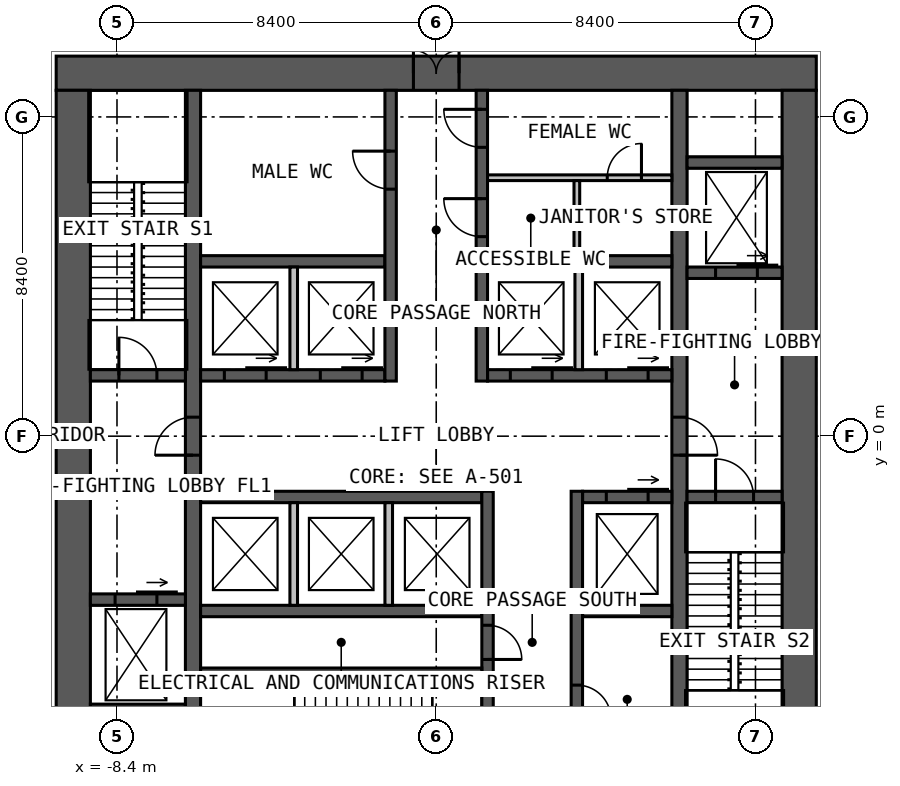
"""IFC4 building model, lengths in metres.
Left out: names, types, materials, properties, quantities, classifications, styles, units other than length and angle.
Written with IfcOpenShell. Run it as: python <this file> out.ifc"""

import sys

from ifc_helpers import new_model, si_unit, direction, frame, frame_2d, origin, place, context, subcontext, project, spatial, rectangle, extrude, element, fill, save


model = new_model("IFC4")
c1 = context("Model", 3, precision=1e-05, world=origin(), true_north=direction((0.0, 1.0)))
c2 = subcontext(c1, "Body", "Model", "MODEL_VIEW")
j1 = project(units=[si_unit("LENGTHUNIT", "METRE"), si_unit("PLANEANGLEUNIT", "RADIAN")], contexts=[c1])
p1 = place(None, origin())
s1 = spatial("IfcSite", under=j1, at=p1, CompositionType="ELEMENT")
p2 = place(p1, origin())
s2 = spatial("IfcBuilding", under=s1, at=p2, CompositionType="ELEMENT")
p3 = place(p2, frame((0.0, 0.0, 6.0)))
s3 = spatial("IfcBuildingStorey", under=s2, at=p3, CompositionType="ELEMENT", Elevation=6.0)
p4 = place(p3, frame((-10.0, 9.55, 0.0), z_axis=(0.0, 0.0, 1.0), x_axis=(1.0, 0.0, 0.0)))
e1 = element("IfcWall", 1, at=p4, inside=s3, PredefinedType="SOLIDWALL", context=c2, shape_type="SweptSolid", body=[
    extrude(rectangle(XDim=20.0, YDim=0.9, at=frame_2d((10.0, 0.0))), origin(), (0.0, 0.0, 1.0), 5.0),
])
p5 = place(p4, frame((9.4, 0.0, 0.0)))
e2 = element("IfcOpeningElement", 2, at=p5, cuts=e1, PredefinedType="OPENING", context=c2, shape_type="SweptSolid", body=[
    extrude(rectangle(XDim=1.2, YDim=2.2, at=frame_2d((0.6, 1.1))), frame((0.0, 0.46, 0.0), z_axis=(0.0, -1.0, 0.0), x_axis=(1.0, 0.0, 0.0)), (0.0, 0.0, 1.0), 0.92),
])
for number, where, z_axis, x_axis in (
    (3, (9.55, -9.1, 0.0), (0.0, 0.0, 1.0), (0.0, 1.0, 0.0)),
    (4, (-9.55, 9.1, 0.0), (0.0, 0.0, 1.0), (0.0, -1.0, 0.0)),
):
    element("IfcWall", number, at=place(p3, frame(where, z_axis=z_axis, x_axis=x_axis)), inside=s3, PredefinedType="SOLIDWALL", context=c2, shape_type="SweptSolid", body=[
        extrude(rectangle(XDim=18.2, YDim=0.9, at=frame_2d((9.1, 0.0))), origin(), (0.0, 0.0, 1.0), 5.0),
    ])
p6 = place(p3, frame((-6.4, -9.1, 0.0), z_axis=(0.0, 0.0, 1.0), x_axis=(0.0, 1.0, 0.0)))
e5 = element("IfcWall", 5, at=p6, inside=s3, PredefinedType="SOLIDWALL", context=c2, shape_type="SweptSolid", body=[
    extrude(rectangle(XDim=18.2, YDim=0.4, at=frame_2d((9.1, 0.0))), origin(), (0.0, 0.0, 1.0), 5.0),
])
p7 = place(p6, frame((8.6, 0.0, 0.0)))
e6 = element("IfcOpeningElement", 6, at=p7, cuts=e5, PredefinedType="OPENING", context=c2, shape_type="SweptSolid", body=[
    extrude(rectangle(XDim=1.0, YDim=2.2, at=frame_2d((0.5, 1.1))), frame((0.0, 0.21, 0.0), z_axis=(0.0, -1.0, 0.0), x_axis=(1.0, 0.0, 0.0)), (0.0, 0.0, 1.0), 0.42),
])
p8 = place(p3, frame((6.4, 9.1, 0.0), z_axis=(0.0, 0.0, 1.0), x_axis=(0.0, -1.0, 0.0)))
e7 = element("IfcWall", 7, at=p8, inside=s3, PredefinedType="SOLIDWALL", context=c2, shape_type="SweptSolid", body=[
    extrude(rectangle(XDim=18.2, YDim=0.4, at=frame_2d((9.1, 0.0))), origin(), (0.0, 0.0, 1.0), 5.0),
])
p9 = place(p8, frame((8.6, 0.0, 0.0)))
e8 = element("IfcOpeningElement", 8, at=p9, cuts=e7, PredefinedType="OPENING", context=c2, shape_type="SweptSolid", body=[
    extrude(rectangle(XDim=1.0, YDim=2.2, at=frame_2d((0.5, 1.1))), frame((0.0, 0.21, 0.0), z_axis=(0.0, -1.0, 0.0), x_axis=(1.0, 0.0, 0.0)), (0.0, 0.0, 1.0), 0.42),
])
p10 = place(p3, frame((-6.2, 1.6, 0.0), z_axis=(0.0, 0.0, 1.0), x_axis=(1.0, 0.0, 0.0)))
e9 = element("IfcWall", 9, at=p10, inside=s3, PredefinedType="SOLIDWALL", context=c2, shape_type="SweptSolid", body=[
    extrude(rectangle(XDim=4.85, YDim=0.3, at=frame_2d((2.425, 0.0))), origin(), (0.0, 0.0, 1.0), 5.0),
])
p11 = place(p10, frame((0.625, 0.0, 0.0)))
e10 = element("IfcOpeningElement", 10, at=p11, cuts=e9, PredefinedType="OPENING", context=c2, shape_type="SweptSolid", body=[
    extrude(rectangle(XDim=1.1, YDim=2.2, at=frame_2d((0.55, 1.1))), frame((0.0, 0.16, 0.0), z_axis=(0.0, -1.0, 0.0), x_axis=(1.0, 0.0, 0.0)), (0.0, 0.0, 1.0), 0.32),
])
p12 = place(p10, frame((3.15, 0.0, 0.0)))
e11 = element("IfcOpeningElement", 11, at=p12, cuts=e9, PredefinedType="OPENING", context=c2, shape_type="SweptSolid", body=[
    extrude(rectangle(XDim=1.1, YDim=2.2, at=frame_2d((0.55, 1.1))), frame((0.0, 0.16, 0.0), z_axis=(0.0, -1.0, 0.0), x_axis=(1.0, 0.0, 0.0)), (0.0, 0.0, 1.0), 0.32),
])
p13 = place(p3, frame((1.35, 1.6, 0.0), z_axis=(0.0, 0.0, 1.0), x_axis=(1.0, 0.0, 0.0)))
e12 = element("IfcWall", 12, at=p13, inside=s3, PredefinedType="SOLIDWALL", context=c2, shape_type="SweptSolid", body=[
    extrude(rectangle(XDim=4.85, YDim=0.3, at=frame_2d((2.425, 0.0))), origin(), (0.0, 0.0, 1.0), 5.0),
])
p14 = place(p13, frame((0.6, 0.0, 0.0)))
e13 = element("IfcOpeningElement", 13, at=p14, cuts=e12, PredefinedType="OPENING", context=c2, shape_type="SweptSolid", body=[
    extrude(rectangle(XDim=1.1, YDim=2.2, at=frame_2d((0.55, 1.1))), frame((0.0, 0.16, 0.0), z_axis=(0.0, -1.0, 0.0), x_axis=(1.0, 0.0, 0.0)), (0.0, 0.0, 1.0), 0.32),
])
p15 = place(p13, frame((3.125, 0.0, 0.0)))
e14 = element("IfcOpeningElement", 14, at=p15, cuts=e12, PredefinedType="OPENING", context=c2, shape_type="SweptSolid", body=[
    extrude(rectangle(XDim=1.1, YDim=2.2, at=frame_2d((0.55, 1.1))), frame((0.0, 0.16, 0.0), z_axis=(0.0, -1.0, 0.0), x_axis=(1.0, 0.0, 0.0)), (0.0, 0.0, 1.0), 0.32),
])
for number, where, z_axis, x_axis in (
    (15, (-6.2, 4.6, 0.0), (0.0, 0.0, 1.0), (1.0, 0.0, 0.0)),
    (16, (1.35, 4.6, 0.0), (0.0, 0.0, 1.0), (1.0, 0.0, 0.0)),
):
    element("IfcWall", number, at=place(p3, frame(where, z_axis=z_axis, x_axis=x_axis)), inside=s3, PredefinedType="SOLIDWALL", context=c2, shape_type="SweptSolid", body=[
        extrude(rectangle(XDim=4.85, YDim=0.3, at=frame_2d((2.425, 0.0))), origin(), (0.0, 0.0, 1.0), 5.0),
    ])
p16 = place(p3, frame((-1.2, 1.45, 0.0), z_axis=(0.0, 0.0, 1.0), x_axis=(0.0, 1.0, 0.0)))
e17 = element("IfcWall", 17, at=p16, inside=s3, PredefinedType="SOLIDWALL", context=c2, shape_type="SweptSolid", body=[
    extrude(rectangle(XDim=7.65, YDim=0.3, at=frame_2d((3.825, 0.0))), origin(), (0.0, 0.0, 1.0), 5.0),
])
p17 = place(p16, frame((5.05, 0.0, 0.0)))
e18 = element("IfcOpeningElement", 18, at=p17, cuts=e17, PredefinedType="OPENING", context=c2, shape_type="SweptSolid", body=[
    extrude(rectangle(XDim=1.0, YDim=2.2, at=frame_2d((0.5, 1.1))), frame((0.0, 0.16, 0.0), z_axis=(0.0, -1.0, 0.0), x_axis=(1.0, 0.0, 0.0)), (0.0, 0.0, 1.0), 0.32),
])
p18 = place(p3, frame((1.2, 1.45, 0.0), z_axis=(0.0, 0.0, 1.0), x_axis=(0.0, 1.0, 0.0)))
e19 = element("IfcWall", 19, at=p18, inside=s3, PredefinedType="SOLIDWALL", context=c2, shape_type="SweptSolid", body=[
    extrude(rectangle(XDim=7.65, YDim=0.3, at=frame_2d((3.825, 0.0))), origin(), (0.0, 0.0, 1.0), 5.0),
])
p19 = place(p18, frame((3.8, 0.0, 0.0)))
e20 = element("IfcOpeningElement", 20, at=p19, cuts=e19, PredefinedType="OPENING", context=c2, shape_type="SweptSolid", body=[
    extrude(rectangle(XDim=1.0, YDim=2.2, at=frame_2d((0.5, 1.1))), frame((0.0, 0.16, 0.0), z_axis=(0.0, -1.0, 0.0), x_axis=(1.0, 0.0, 0.0)), (0.0, 0.0, 1.0), 0.32),
])
p20 = place(p18, frame((6.15, 0.0, 0.0)))
e21 = element("IfcOpeningElement", 21, at=p20, cuts=e19, PredefinedType="OPENING", context=c2, shape_type="SweptSolid", body=[
    extrude(rectangle(XDim=1.0, YDim=2.2, at=frame_2d((0.5, 1.1))), frame((0.0, 0.16, 0.0), z_axis=(0.0, -1.0, 0.0), x_axis=(1.0, 0.0, 0.0)), (0.0, 0.0, 1.0), 0.32),
])
p21 = place(p3, frame((-6.2, -1.6, 0.0), z_axis=(0.0, 0.0, 1.0), x_axis=(1.0, 0.0, 0.0)))
e22 = element("IfcWall", 22, at=p21, inside=s3, PredefinedType="SOLIDWALL", context=c2, shape_type="SweptSolid", body=[
    extrude(rectangle(XDim=7.4, YDim=0.3, at=frame_2d((3.7, 0.0))), origin(), (0.0, 0.0, 1.0), 5.0),
])
p22 = place(p3, frame((3.85, -1.6, 0.0), z_axis=(0.0, 0.0, 1.0), x_axis=(1.0, 0.0, 0.0)))
e23 = element("IfcWall", 23, at=p22, inside=s3, PredefinedType="SOLIDWALL", context=c2, shape_type="SweptSolid", body=[
    extrude(rectangle(XDim=2.35, YDim=0.3, at=frame_2d((1.175, 0.0))), origin(), (0.0, 0.0, 1.0), 5.0),
])
p23 = place(p22, frame((0.625, 0.0, 0.0)))
e24 = element("IfcOpeningElement", 24, at=p23, cuts=e23, PredefinedType="OPENING", context=c2, shape_type="SweptSolid", body=[
    extrude(rectangle(XDim=1.1, YDim=2.2, at=frame_2d((0.55, 1.1))), frame((0.0, 0.16, 0.0), z_axis=(0.0, -1.0, 0.0), x_axis=(1.0, 0.0, 0.0)), (0.0, 0.0, 1.0), 0.32),
])
p24 = place(p3, frame((-6.2, -4.6, 0.0), z_axis=(0.0, 0.0, 1.0), x_axis=(1.0, 0.0, 0.0)))
e25 = element("IfcWall", 25, at=p24, inside=s3, PredefinedType="SOLIDWALL", context=c2, shape_type="SweptSolid", body=[
    extrude(rectangle(XDim=7.4, YDim=0.3, at=frame_2d((3.7, 0.0))), origin(), (0.0, 0.0, 1.0), 5.0),
])
p25 = place(p3, frame((3.85, -4.6, 0.0), z_axis=(0.0, 0.0, 1.0), x_axis=(1.0, 0.0, 0.0)))
e26 = element("IfcWall", 26, at=p25, inside=s3, PredefinedType="SOLIDWALL", context=c2, shape_type="SweptSolid", body=[
    extrude(rectangle(XDim=2.35, YDim=0.3, at=frame_2d((1.175, 0.0))), origin(), (0.0, 0.0, 1.0), 5.0),
])
p26 = place(p3, frame((1.35, -1.45, 0.0), z_axis=(0.0, 0.0, 1.0), x_axis=(0.0, -1.0, 0.0)))
e27 = element("IfcWall", 27, at=p26, inside=s3, PredefinedType="SOLIDWALL", context=c2, shape_type="SweptSolid", body=[
    extrude(rectangle(XDim=7.65, YDim=0.3, at=frame_2d((3.825, 0.0))), origin(), (0.0, 0.0, 1.0), 5.0),
])
p27 = place(p26, frame((5.75, 0.0, 0.0)))
e28 = element("IfcOpeningElement", 28, at=p27, cuts=e27, PredefinedType="OPENING", context=c2, shape_type="SweptSolid", body=[
    extrude(rectangle(XDim=1.0, YDim=2.2, at=frame_2d((0.5, 1.1))), frame((0.0, 0.16, 0.0), z_axis=(0.0, -1.0, 0.0), x_axis=(1.0, 0.0, 0.0)), (0.0, 0.0, 1.0), 0.32),
])
p28 = place(p26, frame((3.525, 0.0, 0.0)))
e29 = element("IfcOpeningElement", 29, at=p28, cuts=e27, PredefinedType="OPENING", context=c2, shape_type="SweptSolid", body=[
    extrude(rectangle(XDim=0.9, YDim=2.2, at=frame_2d((0.45, 1.1))), frame((0.0, 0.16, 0.0), z_axis=(0.0, -1.0, 0.0), x_axis=(1.0, 0.0, 0.0)), (0.0, 0.0, 1.0), 0.32),
])
p29 = place(p3, frame((3.7, -1.45, 0.0), z_axis=(0.0, 0.0, 1.0), x_axis=(0.0, -1.0, 0.0)))
e30 = element("IfcWall", 30, at=p29, inside=s3, PredefinedType="SOLIDWALL", context=c2, shape_type="SweptSolid", body=[
    extrude(rectangle(XDim=7.65, YDim=0.3, at=frame_2d((3.825, 0.0))), origin(), (0.0, 0.0, 1.0), 5.0),
])
p30 = place(p29, frame((5.1, 0.0, 0.0)))
e31 = element("IfcOpeningElement", 31, at=p30, cuts=e30, PredefinedType="OPENING", context=c2, shape_type="SweptSolid", body=[
    extrude(rectangle(XDim=0.9, YDim=2.2, at=frame_2d((0.45, 1.1))), frame((0.0, 0.16, 0.0), z_axis=(0.0, -1.0, 0.0), x_axis=(1.0, 0.0, 0.0)), (0.0, 0.0, 1.0), 0.32),
])
p31 = place(p3, frame((-6.2, -6.2, 0.0), z_axis=(0.0, 0.0, 1.0), x_axis=(1.0, 0.0, 0.0)))
e32 = element("IfcWall", 32, at=p31, inside=s3, PredefinedType="SOLIDWALL", context=c2, shape_type="SweptSolid", body=[
    extrude(rectangle(XDim=7.4, YDim=0.2, at=frame_2d((3.7, 0.0))), origin(), (0.0, 0.0, 1.0), 5.0),
])
p32 = place(p3, frame((-9.1, 1.6, 0.0), z_axis=(0.0, 0.0, 1.0), x_axis=(1.0, 0.0, 0.0)))
e33 = element("IfcWall", 33, at=p32, inside=s3, PredefinedType="SOLIDWALL", context=c2, shape_type="SweptSolid", body=[
    extrude(rectangle(XDim=2.5, YDim=0.3, at=frame_2d((1.25, 0.0))), origin(), (0.0, 0.0, 1.0), 5.0),
])
p33 = place(p32, frame((0.75, 0.0, 0.0)))
e34 = element("IfcOpeningElement", 34, at=p33, cuts=e33, PredefinedType="OPENING", context=c2, shape_type="SweptSolid", body=[
    extrude(rectangle(XDim=1.0, YDim=2.2, at=frame_2d((0.5, 1.1))), frame((0.0, 0.16, 0.0), z_axis=(0.0, -1.0, 0.0), x_axis=(1.0, 0.0, 0.0)), (0.0, 0.0, 1.0), 0.32),
])
p34 = place(p3, frame((6.6, -1.6, 0.0), z_axis=(0.0, 0.0, 1.0), x_axis=(1.0, 0.0, 0.0)))
e35 = element("IfcWall", 35, at=p34, inside=s3, PredefinedType="SOLIDWALL", context=c2, shape_type="SweptSolid", body=[
    extrude(rectangle(XDim=2.5, YDim=0.3, at=frame_2d((1.25, 0.0))), origin(), (0.0, 0.0, 1.0), 5.0),
])
p35 = place(p34, frame((0.75, 0.0, 0.0)))
e36 = element("IfcOpeningElement", 36, at=p35, cuts=e35, PredefinedType="OPENING", context=c2, shape_type="SweptSolid", body=[
    extrude(rectangle(XDim=1.0, YDim=2.2, at=frame_2d((0.5, 1.1))), frame((0.0, 0.16, 0.0), z_axis=(0.0, -1.0, 0.0), x_axis=(1.0, 0.0, 0.0)), (0.0, 0.0, 1.0), 0.32),
])
p36 = place(p3, frame((-9.1, -4.3, 0.0), z_axis=(0.0, 0.0, 1.0), x_axis=(1.0, 0.0, 0.0)))
e37 = element("IfcWall", 37, at=p36, inside=s3, PredefinedType="SOLIDWALL", context=c2, shape_type="SweptSolid", body=[
    extrude(rectangle(XDim=2.5, YDim=0.3, at=frame_2d((1.25, 0.0))), origin(), (0.0, 0.0, 1.0), 5.0),
])
p37 = place(p36, frame((0.65, 0.0, 0.0)))
e38 = element("IfcOpeningElement", 38, at=p37, cuts=e37, PredefinedType="OPENING", context=c2, shape_type="SweptSolid", body=[
    extrude(rectangle(XDim=1.1, YDim=2.2, at=frame_2d((0.55, 1.1))), frame((0.0, 0.16, 0.0), z_axis=(0.0, -1.0, 0.0), x_axis=(1.0, 0.0, 0.0)), (0.0, 0.0, 1.0), 0.32),
])
p38 = place(p3, frame((6.6, 4.3, 0.0), z_axis=(0.0, 0.0, 1.0), x_axis=(1.0, 0.0, 0.0)))
e39 = element("IfcWall", 39, at=p38, inside=s3, PredefinedType="SOLIDWALL", context=c2, shape_type="SweptSolid", body=[
    extrude(rectangle(XDim=2.5, YDim=0.3, at=frame_2d((1.25, 0.0))), origin(), (0.0, 0.0, 1.0), 5.0),
])
p39 = place(p38, frame((0.75, 0.0, 0.0)))
e40 = element("IfcOpeningElement", 40, at=p39, cuts=e39, PredefinedType="OPENING", context=c2, shape_type="SweptSolid", body=[
    extrude(rectangle(XDim=1.1, YDim=2.2, at=frame_2d((0.55, 1.1))), frame((0.0, 0.16, 0.0), z_axis=(0.0, -1.0, 0.0), x_axis=(1.0, 0.0, 0.0)), (0.0, 0.0, 1.0), 0.32),
])
for number, where, z_axis, x_axis in (
    (41, (-9.1, -7.2, 0.0), (0.0, 0.0, 1.0), (1.0, 0.0, 0.0)),
    (42, (6.6, 7.2, 0.0), (0.0, 0.0, 1.0), (1.0, 0.0, 0.0)),
):
    element("IfcWall", number, at=place(p3, frame(where, z_axis=z_axis, x_axis=x_axis)), inside=s3, PredefinedType="SOLIDWALL", context=c2, shape_type="SweptSolid", body=[
        extrude(rectangle(XDim=2.5, YDim=0.3, at=frame_2d((1.25, 0.0))), origin(), (0.0, 0.0, 1.0), 5.0),
    ])
for number, where, z_axis, x_axis in (
    (43, (-3.75, 1.75, 0.0), (0.0, 0.0, 1.0), (0.0, 1.0, 0.0)),
    (44, (3.75, 1.75, 0.0), (0.0, 0.0, 1.0), (0.0, 1.0, 0.0)),
    (45, (-3.75, -1.75, 0.0), (0.0, 0.0, 1.0), (0.0, -1.0, 0.0)),
    (46, (-1.25, -1.75, 0.0), (0.0, 0.0, 1.0), (0.0, -1.0, 0.0)),
):
    element("IfcWall", number, at=place(p3, frame(where, z_axis=z_axis, x_axis=x_axis)), inside=s3, PredefinedType="SOLIDWALL", context=c2, shape_type="SweptSolid", body=[
        extrude(rectangle(XDim=2.7, YDim=0.2, at=frame_2d((1.35, 0.0))), origin(), (0.0, 0.0, 1.0), 4.75),
    ])
p40 = place(p3, frame((1.35, 6.8, 0.0), z_axis=(0.0, 0.0, 1.0), x_axis=(1.0, 0.0, 0.0)))
e47 = element("IfcWall", 47, at=p40, inside=s3, PredefinedType="PARTITIONING", context=c2, shape_type="SweptSolid", body=[
    extrude(rectangle(XDim=4.85, YDim=0.15, at=frame_2d((2.425, 0.0))), origin(), (0.0, 0.0, 1.0), 4.75),
])
p41 = place(p40, frame((3.15, 0.0, 0.0)))
e48 = element("IfcOpeningElement", 48, at=p41, cuts=e47, PredefinedType="OPENING", context=c2, shape_type="SweptSolid", body=[
    extrude(rectangle(XDim=0.9, YDim=2.2, at=frame_2d((0.45, 1.1))), frame((0.0, 0.085, 0.0), z_axis=(0.0, -1.0, 0.0), x_axis=(1.0, 0.0, 0.0)), (0.0, 0.0, 1.0), 0.17),
])
p42 = place(p3, frame((3.7, 4.75, 0.0), z_axis=(0.0, 0.0, 1.0), x_axis=(0.0, 1.0, 0.0)))
e49 = element("IfcWall", 49, at=p42, inside=s3, PredefinedType="PARTITIONING", context=c2, shape_type="SweptSolid", body=[
    extrude(rectangle(XDim=1.975, YDim=0.15, at=frame_2d((0.988, 0.0))), origin(), (0.0, 0.0, 1.0), 4.75),
])
p43 = place(p5, origin())
e50 = element("IfcDoor", 50, at=p43, inside=s3, OperationType="DOUBLE_DOOR_SINGLE_SWING", PredefinedType="DOOR", context=c2, shape_type="SweptSolid", body=[
    extrude(rectangle(XDim=1.2, YDim=2.2, at=frame_2d((0.6, 1.1))), frame((0.0, 0.025, 0.0), z_axis=(0.0, -1.0, 0.0), x_axis=(1.0, 0.0, 0.0)), (0.0, 0.0, 1.0), 0.05),
])
fill(e2, e50)
p44 = place(p7, origin())
e51 = element("IfcDoor", 51, at=p44, inside=s3, OperationType="SINGLE_SWING_LEFT", PredefinedType="DOOR", context=c2, shape_type="SweptSolid", body=[
    extrude(rectangle(XDim=1.0, YDim=2.2, at=frame_2d((0.5, 1.1))), frame((0.0, 0.025, 0.0), z_axis=(0.0, -1.0, 0.0), x_axis=(1.0, 0.0, 0.0)), (0.0, 0.0, 1.0), 0.05),
])
fill(e6, e51)
p45 = place(p9, origin())
e52 = element("IfcDoor", 52, at=p45, inside=s3, OperationType="SINGLE_SWING_RIGHT", PredefinedType="DOOR", context=c2, shape_type="SweptSolid", body=[
    extrude(rectangle(XDim=1.0, YDim=2.2, at=frame_2d((0.5, 1.1))), frame((0.0, 0.025, 0.0), z_axis=(0.0, -1.0, 0.0), x_axis=(1.0, 0.0, 0.0)), (0.0, 0.0, 1.0), 0.05),
])
fill(e8, e52)
p46 = place(p33, origin())
e53 = element("IfcDoor", 53, at=p46, inside=s3, OperationType="SINGLE_SWING_LEFT", PredefinedType="DOOR", context=c2, shape_type="SweptSolid", body=[
    extrude(rectangle(XDim=1.0, YDim=2.2, at=frame_2d((0.5, 1.1))), frame((0.0, 0.025, 0.0), z_axis=(0.0, -1.0, 0.0), x_axis=(1.0, 0.0, 0.0)), (0.0, 0.0, 1.0), 0.05),
])
fill(e34, e53)
p47 = place(p35, origin())
e54 = element("IfcDoor", 54, at=p47, inside=s3, OperationType="SINGLE_SWING_LEFT", PredefinedType="DOOR", context=c2, shape_type="SweptSolid", body=[
    extrude(rectangle(XDim=1.0, YDim=2.2, at=frame_2d((0.5, 1.1))), frame((0.0, 0.025, 0.0), z_axis=(0.0, -1.0, 0.0), x_axis=(1.0, 0.0, 0.0)), (0.0, 0.0, 1.0), 0.05),
])
fill(e36, e54)
p48 = place(p17, origin())
e55 = element("IfcDoor", 55, at=p48, inside=s3, OperationType="SINGLE_SWING_RIGHT", PredefinedType="DOOR", context=c2, shape_type="SweptSolid", body=[
    extrude(rectangle(XDim=1.0, YDim=2.2, at=frame_2d((0.5, 1.1))), frame((0.0, 0.025, 0.0), z_axis=(0.0, -1.0, 0.0), x_axis=(1.0, 0.0, 0.0)), (0.0, 0.0, 1.0), 0.05),
])
fill(e18, e55)
p49 = place(p19, origin())
e56 = element("IfcDoor", 56, at=p49, inside=s3, OperationType="SINGLE_SWING_RIGHT", PredefinedType="DOOR", context=c2, shape_type="SweptSolid", body=[
    extrude(rectangle(XDim=1.0, YDim=2.2, at=frame_2d((0.5, 1.1))), frame((0.0, 0.025, 0.0), z_axis=(0.0, -1.0, 0.0), x_axis=(1.0, 0.0, 0.0)), (0.0, 0.0, 1.0), 0.05),
])
fill(e20, e56)
p50 = place(p20, origin())
e57 = element("IfcDoor", 57, at=p50, inside=s3, OperationType="SINGLE_SWING_RIGHT", PredefinedType="DOOR", context=c2, shape_type="SweptSolid", body=[
    extrude(rectangle(XDim=1.0, YDim=2.2, at=frame_2d((0.5, 1.1))), frame((0.0, 0.025, 0.0), z_axis=(0.0, -1.0, 0.0), x_axis=(1.0, 0.0, 0.0)), (0.0, 0.0, 1.0), 0.05),
])
fill(e21, e57)
p51 = place(p28, origin())
e58 = element("IfcDoor", 58, at=p51, inside=s3, OperationType="SINGLE_SWING_RIGHT", PredefinedType="DOOR", context=c2, shape_type="SweptSolid", body=[
    extrude(rectangle(XDim=0.9, YDim=2.2, at=frame_2d((0.45, 1.1))), frame((0.0, 0.025, 0.0), z_axis=(0.0, -1.0, 0.0), x_axis=(1.0, 0.0, 0.0)), (0.0, 0.0, 1.0), 0.05),
])
fill(e29, e58)
p52 = place(p30, origin())
e59 = element("IfcDoor", 59, at=p52, inside=s3, OperationType="SINGLE_SWING_RIGHT", PredefinedType="DOOR", context=c2, shape_type="SweptSolid", body=[
    extrude(rectangle(XDim=0.9, YDim=2.2, at=frame_2d((0.45, 1.1))), frame((0.0, 0.025, 0.0), z_axis=(0.0, -1.0, 0.0), x_axis=(1.0, 0.0, 0.0)), (0.0, 0.0, 1.0), 0.05),
])
fill(e31, e59)
p53 = place(p41, origin())
e60 = element("IfcDoor", 60, at=p53, inside=s3, OperationType="SINGLE_SWING_RIGHT", PredefinedType="DOOR", context=c2, shape_type="SweptSolid", body=[
    extrude(rectangle(XDim=0.9, YDim=2.2, at=frame_2d((0.45, 1.1))), frame((0.0, 0.025, 0.0), z_axis=(0.0, -1.0, 0.0), x_axis=(1.0, 0.0, 0.0)), (0.0, 0.0, 1.0), 0.05),
])
fill(e48, e60)
p54 = place(p11, origin())
e61 = element("IfcDoor", 61, at=p54, inside=s3, OperationType="SLIDING_TO_LEFT", PredefinedType="DOOR", context=c2, shape_type="SweptSolid", body=[
    extrude(rectangle(XDim=1.1, YDim=2.2, at=frame_2d((0.55, 1.1))), frame((0.0, 0.025, 0.0), z_axis=(0.0, -1.0, 0.0), x_axis=(1.0, 0.0, 0.0)), (0.0, 0.0, 1.0), 0.05),
])
fill(e10, e61)
p55 = place(p12, origin())
e62 = element("IfcDoor", 62, at=p55, inside=s3, OperationType="SLIDING_TO_LEFT", PredefinedType="DOOR", context=c2, shape_type="SweptSolid", body=[
    extrude(rectangle(XDim=1.1, YDim=2.2, at=frame_2d((0.55, 1.1))), frame((0.0, 0.025, 0.0), z_axis=(0.0, -1.0, 0.0), x_axis=(1.0, 0.0, 0.0)), (0.0, 0.0, 1.0), 0.05),
])
fill(e11, e62)
p56 = place(p14, origin())
e63 = element("IfcDoor", 63, at=p56, inside=s3, OperationType="SLIDING_TO_LEFT", PredefinedType="DOOR", context=c2, shape_type="SweptSolid", body=[
    extrude(rectangle(XDim=1.1, YDim=2.2, at=frame_2d((0.55, 1.1))), frame((0.0, 0.025, 0.0), z_axis=(0.0, -1.0, 0.0), x_axis=(1.0, 0.0, 0.0)), (0.0, 0.0, 1.0), 0.05),
])
fill(e13, e63)
p57 = place(p15, origin())
e64 = element("IfcDoor", 64, at=p57, inside=s3, OperationType="SLIDING_TO_LEFT", PredefinedType="DOOR", context=c2, shape_type="SweptSolid", body=[
    extrude(rectangle(XDim=1.1, YDim=2.2, at=frame_2d((0.55, 1.1))), frame((0.0, 0.025, 0.0), z_axis=(0.0, -1.0, 0.0), x_axis=(1.0, 0.0, 0.0)), (0.0, 0.0, 1.0), 0.05),
])
fill(e14, e64)
p58 = place(p23, origin())
e65 = element("IfcDoor", 65, at=p58, inside=s3, OperationType="SLIDING_TO_LEFT", PredefinedType="DOOR", context=c2, shape_type="SweptSolid", body=[
    extrude(rectangle(XDim=1.1, YDim=2.2, at=frame_2d((0.55, 1.1))), frame((0.0, 0.025, 0.0), z_axis=(0.0, -1.0, 0.0), x_axis=(1.0, 0.0, 0.0)), (0.0, 0.0, 1.0), 0.05),
])
fill(e24, e65)
p59 = place(p37, origin())
e66 = element("IfcDoor", 66, at=p59, inside=s3, OperationType="SLIDING_TO_LEFT", PredefinedType="DOOR", context=c2, shape_type="SweptSolid", body=[
    extrude(rectangle(XDim=1.1, YDim=2.2, at=frame_2d((0.55, 1.1))), frame((0.0, 0.025, 0.0), z_axis=(0.0, -1.0, 0.0), x_axis=(1.0, 0.0, 0.0)), (0.0, 0.0, 1.0), 0.05),
])
fill(e38, e66)
p60 = place(p39, origin())
e67 = element("IfcDoor", 67, at=p60, inside=s3, OperationType="SLIDING_TO_LEFT", PredefinedType="DOOR", context=c2, shape_type="SweptSolid", body=[
    extrude(rectangle(XDim=1.1, YDim=2.2, at=frame_2d((0.55, 1.1))), frame((0.0, 0.025, 0.0), z_axis=(0.0, -1.0, 0.0), x_axis=(1.0, 0.0, 0.0)), (0.0, 0.0, 1.0), 0.05),
])
fill(e40, e67)
save(model, sys.argv[1])
